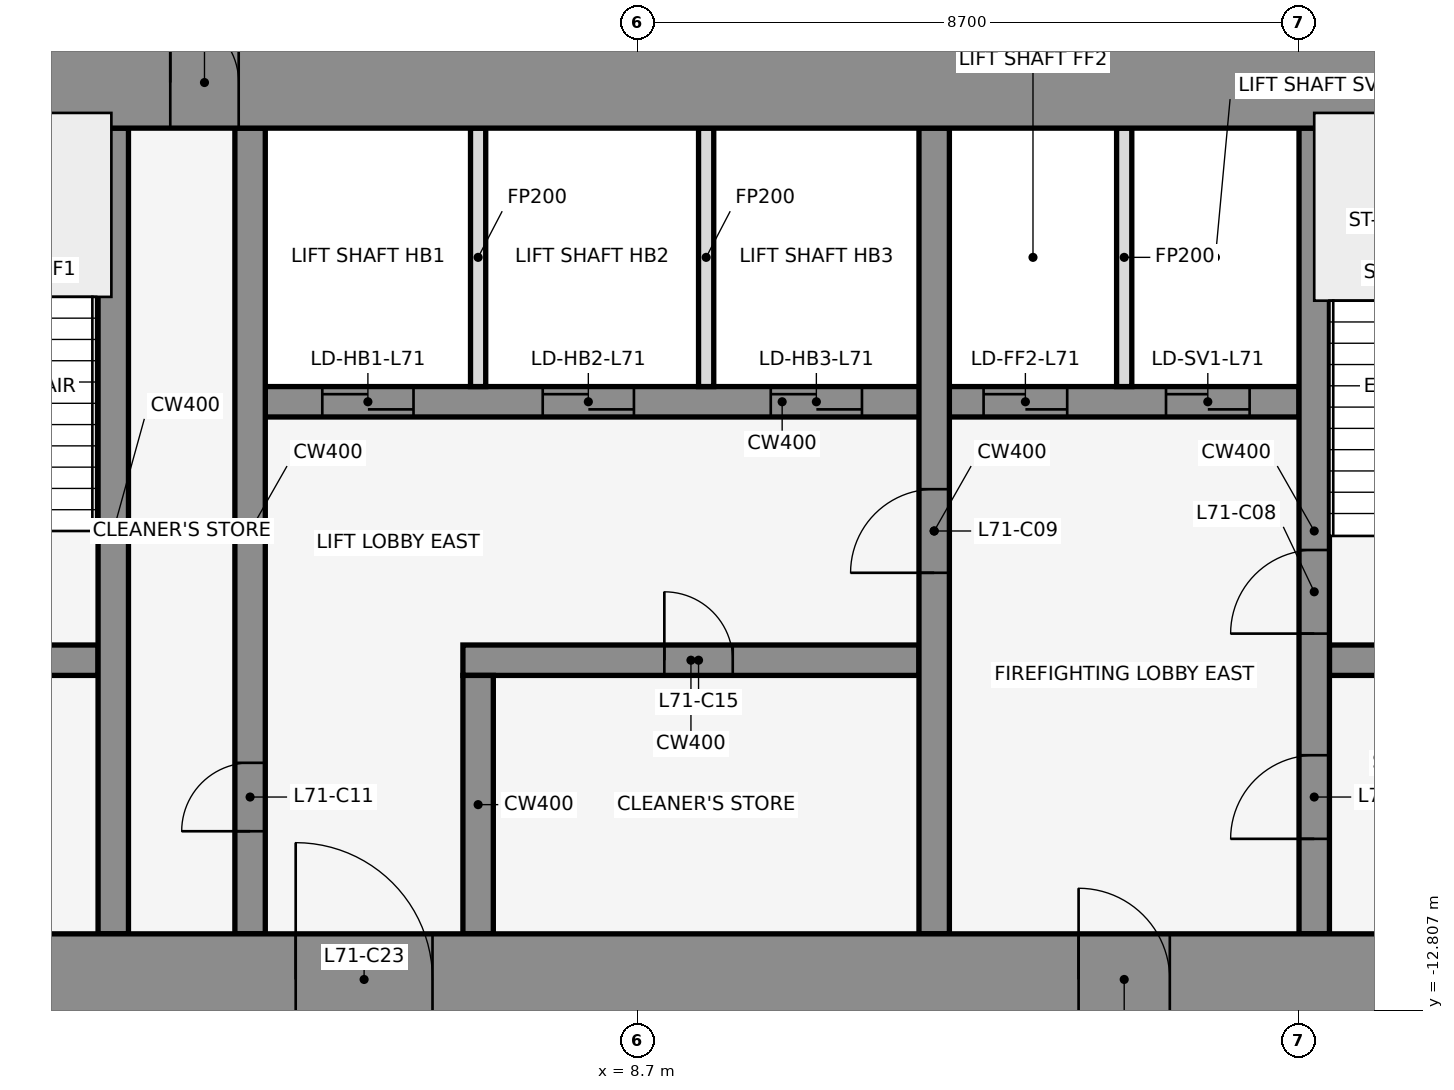
"""IFC4 building model, lengths in metres.
Left out: names, types, materials, properties, quantities, classifications, styles, units other than length and angle.
Written with IfcOpenShell. Run it as: python <this file> out.ifc"""

import sys

from ifc_helpers import new_model, si_unit, direction, frame, frame_2d, origin, place, context, subcontext, project, spatial, rectangle, extrude, element, fill, save


model = new_model("IFC4")
c1 = context("Model", 3, precision=1e-05, world=origin(), true_north=direction((0.0, 1.0)))
c2 = subcontext(c1, "Body", "Model", "MODEL_VIEW")
j1 = project(units=[si_unit("LENGTHUNIT", "METRE"), si_unit("PLANEANGLEUNIT", "RADIAN")], contexts=[c1])
p1 = place(None, origin())
s1 = spatial("IfcSite", under=j1, at=p1, CompositionType="ELEMENT")
p2 = place(p1, origin())
s2 = spatial("IfcBuilding", under=s1, at=p2, CompositionType="ELEMENT")
p3 = place(p2, frame((0.0, 0.0, 315.5)))
s3 = spatial("IfcBuildingStorey", under=s2, at=p3, CompositionType="ELEMENT", Elevation=315.5)
for number, where, z_axis, x_axis in (
    (1, (16.432, -0.105, 0.0), (0.0, 0.0, 1.0), (-0.84, 0.543, 0.0)),
    (2, (1.901, 1.08, 0.0), (0.0, 0.0, 1.0), (-0.84, -0.543, 0.0)),
):
    element("IfcWall", number, at=place(p3, frame(where, z_axis=z_axis, x_axis=x_axis)), inside=s3, PredefinedType="STANDARD", context=c2, shape_type="SweptSolid", body=[
        extrude(rectangle(XDim=2.183, YDim=0.25, at=frame_2d((1.091, 0.0))), origin(), (0.0, 0.0, 1.0), 4.35),
    ])
p4 = place(p3, frame((-1.6, -8.2, 0.0), z_axis=(0.0, 0.0, 1.0), x_axis=(1.0, 0.0, 0.0)))
e3 = element("IfcWall", 3, at=p4, inside=s3, PredefinedType="SHEAR", context=c2, shape_type="SweptSolid", body=[
    extrude(rectangle(XDim=3.2, YDim=0.4, at=frame_2d((1.6, 0.0))), origin(), (0.0, 0.0, 1.0), 4.5),
])
p5 = place(p4, frame((1.05, 0.0, 0.0)))
e4 = element("IfcOpeningElement", 4, at=p5, cuts=e3, PredefinedType="OPENING", context=c2, shape_type="SweptSolid", body=[
    extrude(rectangle(XDim=1.2, YDim=2.1, at=frame_2d((0.6, 1.05))), frame((0.0, 0.212, 0.0), z_axis=(0.0, -1.0, 0.0), x_axis=(1.0, 0.0, 0.0)), (0.0, 0.0, 1.0), 0.424),
])
p6 = place(p3, frame((6.4, -8.2, 0.0), z_axis=(0.0, 0.0, 1.0), x_axis=(1.0, 0.0, 0.0)))
e5 = element("IfcWall", 5, at=p6, inside=s3, PredefinedType="SHEAR", context=c2, shape_type="SweptSolid", body=[
    extrude(rectangle(XDim=6.0, YDim=0.4, at=frame_2d((3.0, 0.0))), origin(), (0.0, 0.0, 1.0), 4.5),
])
p7 = place(p6, frame((2.65, 0.0, 0.0)))
e6 = element("IfcOpeningElement", 6, at=p7, cuts=e5, PredefinedType="OPENING", context=c2, shape_type="SweptSolid", body=[
    extrude(rectangle(XDim=0.9, YDim=2.1, at=frame_2d((0.45, 1.05))), frame((0.0, 0.212, 0.0), z_axis=(0.0, -1.0, 0.0), x_axis=(1.0, 0.0, 0.0)), (0.0, 0.0, 1.0), 0.424),
])
p8 = place(p3, frame((17.8, -8.2, 0.0), z_axis=(0.0, 0.0, 1.0), x_axis=(1.0, 0.0, 0.0)))
e7 = element("IfcWall", 7, at=p8, inside=s3, PredefinedType="SHEAR", context=c2, shape_type="SweptSolid", body=[
    extrude(rectangle(XDim=3.0, YDim=0.4, at=frame_2d((1.5, 0.0))), origin(), (0.0, 0.0, 1.0), 4.5),
])
p9 = place(p8, frame((0.85, 0.0, 0.0)))
e8 = element("IfcOpeningElement", 8, at=p9, cuts=e7, PredefinedType="OPENING", context=c2, shape_type="SweptSolid", body=[
    extrude(rectangle(XDim=1.2, YDim=2.1, at=frame_2d((0.6, 1.05))), frame((0.0, 0.212, 0.0), z_axis=(0.0, -1.0, 0.0), x_axis=(1.0, 0.0, 0.0)), (0.0, 0.0, 1.0), 0.424),
])
p10 = place(p3, frame((3.8, -4.8, 0.0), z_axis=(0.0, 0.0, 1.0), x_axis=(1.0, 0.0, 0.0)))
e9 = element("IfcWall", 9, at=p10, inside=s3, PredefinedType="SHEAR", context=c2, shape_type="SweptSolid", body=[
    extrude(rectangle(XDim=13.6, YDim=0.4, at=frame_2d((6.8, 0.0))), origin(), (0.0, 0.0, 1.0), 4.5),
])
p11 = place(p10, frame((0.75, 0.0, 0.0)))
e10 = element("IfcOpeningElement", 10, at=p11, cuts=e9, PredefinedType="OPENING", context=c2, shape_type="SweptSolid", body=[
    extrude(rectangle(XDim=1.2, YDim=2.1, at=frame_2d((0.6, 1.05))), frame((0.0, 0.212, 0.0), z_axis=(0.0, -1.0, 0.0), x_axis=(1.0, 0.0, 0.0)), (0.0, 0.0, 1.0), 0.424),
])
p12 = place(p10, frame((3.65, 0.0, 0.0)))
e11 = element("IfcOpeningElement", 11, at=p12, cuts=e9, PredefinedType="OPENING", context=c2, shape_type="SweptSolid", body=[
    extrude(rectangle(XDim=1.2, YDim=2.1, at=frame_2d((0.6, 1.05))), frame((0.0, 0.212, 0.0), z_axis=(0.0, -1.0, 0.0), x_axis=(1.0, 0.0, 0.0)), (0.0, 0.0, 1.0), 0.424),
])
p13 = place(p10, frame((6.65, 0.0, 0.0)))
e12 = element("IfcOpeningElement", 12, at=p13, cuts=e9, PredefinedType="OPENING", context=c2, shape_type="SweptSolid", body=[
    extrude(rectangle(XDim=1.2, YDim=2.1, at=frame_2d((0.6, 1.05))), frame((0.0, 0.212, 0.0), z_axis=(0.0, -1.0, 0.0), x_axis=(1.0, 0.0, 0.0)), (0.0, 0.0, 1.0), 0.424),
])
p14 = place(p10, frame((9.45, 0.0, 0.0)))
e13 = element("IfcOpeningElement", 13, at=p14, cuts=e9, PredefinedType="OPENING", context=c2, shape_type="SweptSolid", body=[
    extrude(rectangle(XDim=1.1, YDim=2.1, at=frame_2d((0.55, 1.05))), frame((0.0, 0.212, 0.0), z_axis=(0.0, -1.0, 0.0), x_axis=(1.0, 0.0, 0.0)), (0.0, 0.0, 1.0), 0.424),
])
p15 = place(p10, frame((11.85, 0.0, 0.0)))
e14 = element("IfcOpeningElement", 14, at=p15, cuts=e9, PredefinedType="OPENING", context=c2, shape_type="SweptSolid", body=[
    extrude(rectangle(XDim=1.1, YDim=2.1, at=frame_2d((0.55, 1.05))), frame((0.0, 0.212, 0.0), z_axis=(0.0, -1.0, 0.0), x_axis=(1.0, 0.0, 0.0)), (0.0, 0.0, 1.0), 0.424),
])
p16 = place(p3, frame((1.8, -11.8, 0.0), z_axis=(0.0, 0.0, 1.0), x_axis=(0.0, 1.0, 0.0)))
e15 = element("IfcWall", 15, at=p16, inside=s3, PredefinedType="SHEAR", context=c2, shape_type="SweptSolid", body=[
    extrude(rectangle(XDim=10.6, YDim=0.4, at=frame_2d((5.3, 0.0))), origin(), (0.0, 0.0, 1.0), 4.5),
])
p17 = place(p3, frame((3.6, -11.8, 0.0), z_axis=(0.0, 0.0, 1.0), x_axis=(0.0, 1.0, 0.0)))
e16 = element("IfcWall", 16, at=p17, inside=s3, PredefinedType="SHEAR", context=c2, shape_type="SweptSolid", body=[
    extrude(rectangle(XDim=10.6, YDim=0.4, at=frame_2d((5.3, 0.0))), origin(), (0.0, 0.0, 1.0), 4.5),
])
p18 = place(p17, frame((1.35, 0.0, 0.0)))
e17 = element("IfcOpeningElement", 17, at=p18, cuts=e16, PredefinedType="OPENING", context=c2, shape_type="SweptSolid", body=[
    extrude(rectangle(XDim=0.9, YDim=2.1, at=frame_2d((0.45, 1.05))), frame((0.0, 0.212, 0.0), z_axis=(0.0, -1.0, 0.0), x_axis=(1.0, 0.0, 0.0)), (0.0, 0.0, 1.0), 0.424),
])
p19 = place(p3, frame((6.6, -11.8, 0.0), z_axis=(0.0, 0.0, 1.0), x_axis=(0.0, 1.0, 0.0)))
e18 = element("IfcWall", 18, at=p19, inside=s3, PredefinedType="SHEAR", context=c2, shape_type="SweptSolid", body=[
    extrude(rectangle(XDim=3.4, YDim=0.4, at=frame_2d((1.7, 0.0))), origin(), (0.0, 0.0, 1.0), 4.5),
])
for number, where, z_axis, x_axis in (
    (19, (6.6, -4.6, 0.0), (0.0, 0.0, 1.0), (0.0, 1.0, 0.0)),
    (20, (9.6, -4.6, 0.0), (0.0, 0.0, 1.0), (0.0, 1.0, 0.0)),
):
    element("IfcWall", number, at=place(p3, frame(where, z_axis=z_axis, x_axis=x_axis)), inside=s3, PredefinedType="PARTITIONING", context=c2, shape_type="SweptSolid", body=[
        extrude(rectangle(XDim=3.4, YDim=0.2, at=frame_2d((1.7, 0.0))), origin(), (0.0, 0.0, 1.0), 3.418),
    ])
p20 = place(p3, frame((12.6, -11.8, 0.0), z_axis=(0.0, 0.0, 1.0), x_axis=(0.0, 1.0, 0.0)))
e21 = element("IfcWall", 21, at=p20, inside=s3, PredefinedType="SHEAR", context=c2, shape_type="SweptSolid", body=[
    extrude(rectangle(XDim=10.6, YDim=0.4, at=frame_2d((5.3, 0.0))), origin(), (0.0, 0.0, 1.0), 4.5),
])
p21 = place(p20, frame((4.75, 0.0, 0.0)))
e22 = element("IfcOpeningElement", 22, at=p21, cuts=e21, PredefinedType="OPENING", context=c2, shape_type="SweptSolid", body=[
    extrude(rectangle(XDim=1.1, YDim=2.1, at=frame_2d((0.55, 1.05))), frame((0.0, 0.212, 0.0), z_axis=(0.0, -1.0, 0.0), x_axis=(1.0, 0.0, 0.0)), (0.0, 0.0, 1.0), 0.424),
])
p22 = place(p3, frame((15.1, -4.6, 0.0), z_axis=(0.0, 0.0, 1.0), x_axis=(0.0, 1.0, 0.0)))
e23 = element("IfcWall", 23, at=p22, inside=s3, PredefinedType="PARTITIONING", context=c2, shape_type="SweptSolid", body=[
    extrude(rectangle(XDim=3.4, YDim=0.2, at=frame_2d((1.7, 0.0))), origin(), (0.0, 0.0, 1.0), 3.418),
])
p23 = place(p3, frame((17.6, -11.8, 0.0), z_axis=(0.0, 0.0, 1.0), x_axis=(0.0, 1.0, 0.0)))
e24 = element("IfcWall", 24, at=p23, inside=s3, PredefinedType="SHEAR", context=c2, shape_type="SweptSolid", body=[
    extrude(rectangle(XDim=10.6, YDim=0.4, at=frame_2d((5.3, 0.0))), origin(), (0.0, 0.0, 1.0), 4.5),
])
p24 = place(p23, frame((1.25, 0.0, 0.0)))
e25 = element("IfcOpeningElement", 25, at=p24, cuts=e24, PredefinedType="OPENING", context=c2, shape_type="SweptSolid", body=[
    extrude(rectangle(XDim=1.1, YDim=2.1, at=frame_2d((0.55, 1.05))), frame((0.0, 0.212, 0.0), z_axis=(0.0, -1.0, 0.0), x_axis=(1.0, 0.0, 0.0)), (0.0, 0.0, 1.0), 0.424),
])
p25 = place(p23, frame((3.95, 0.0, 0.0)))
e26 = element("IfcOpeningElement", 26, at=p25, cuts=e24, PredefinedType="OPENING", context=c2, shape_type="SweptSolid", body=[
    extrude(rectangle(XDim=1.1, YDim=2.1, at=frame_2d((0.55, 1.05))), frame((0.0, 0.212, 0.0), z_axis=(0.0, -1.0, 0.0), x_axis=(1.0, 0.0, 0.0)), (0.0, 0.0, 1.0), 0.424),
])
p26 = place(p3, frame((-22.0, -0.6, 0.0), z_axis=(0.0, 0.0, 1.0), x_axis=(1.0, 0.0, 0.0)))
e27 = element("IfcWall", 27, at=p26, inside=s3, PredefinedType="SHEAR", context=c2, shape_type="SweptSolid", body=[
    extrude(rectangle(XDim=44.0, YDim=1.2, at=frame_2d((22.0, 0.0))), origin(), (0.0, 0.0, 1.0), 4.5),
])
p27 = place(p26, frame((18.55, 0.0, 0.0)))
e28 = element("IfcOpeningElement", 28, at=p27, cuts=e27, PredefinedType="OPENING", context=c2, shape_type="SweptSolid", body=[
    extrude(rectangle(XDim=0.9, YDim=2.1, at=frame_2d((0.45, 1.05))), frame((0.0, 0.612, 0.0), z_axis=(0.0, -1.0, 0.0), x_axis=(1.0, 0.0, 0.0)), (0.0, 0.0, 1.0), 1.224),
])
p28 = place(p26, frame((24.55, 0.0, 0.0)))
e29 = element("IfcOpeningElement", 29, at=p28, cuts=e27, PredefinedType="OPENING", context=c2, shape_type="SweptSolid", body=[
    extrude(rectangle(XDim=0.9, YDim=2.1, at=frame_2d((0.45, 1.05))), frame((0.0, 0.612, 0.0), z_axis=(0.0, -1.0, 0.0), x_axis=(1.0, 0.0, 0.0)), (0.0, 0.0, 1.0), 1.224),
])
p29 = place(p3, frame((-22.0, -12.4, 0.0), z_axis=(0.0, 0.0, 1.0), x_axis=(1.0, 0.0, 0.0)))
e30 = element("IfcWall", 30, at=p29, inside=s3, PredefinedType="SHEAR", context=c2, shape_type="SweptSolid", body=[
    extrude(rectangle(XDim=44.0, YDim=1.2, at=frame_2d((22.0, 0.0))), origin(), (0.0, 0.0, 1.0), 4.5),
])
p30 = place(p29, frame((2.2, 0.0, 0.0)))
e31 = element("IfcOpeningElement", 31, at=p30, cuts=e30, PredefinedType="OPENING", context=c2, shape_type="SweptSolid", body=[
    extrude(rectangle(XDim=1.2, YDim=2.1, at=frame_2d((0.6, 1.05))), frame((0.0, 0.612, 0.0), z_axis=(0.0, -1.0, 0.0), x_axis=(1.0, 0.0, 0.0)), (0.0, 0.0, 1.0), 1.224),
])
p31 = place(p29, frame((21.4, 0.0, 0.0)))
e32 = element("IfcOpeningElement", 32, at=p31, cuts=e30, PredefinedType="OPENING", context=c2, shape_type="SweptSolid", body=[
    extrude(rectangle(XDim=1.2, YDim=2.1, at=frame_2d((0.6, 1.05))), frame((0.0, 0.612, 0.0), z_axis=(0.0, -1.0, 0.0), x_axis=(1.0, 0.0, 0.0)), (0.0, 0.0, 1.0), 1.224),
])
p32 = place(p29, frame((40.6, 0.0, 0.0)))
e33 = element("IfcOpeningElement", 33, at=p32, cuts=e30, PredefinedType="OPENING", context=c2, shape_type="SweptSolid", body=[
    extrude(rectangle(XDim=1.2, YDim=2.1, at=frame_2d((0.6, 1.05))), frame((0.0, 0.612, 0.0), z_axis=(0.0, -1.0, 0.0), x_axis=(1.0, 0.0, 0.0)), (0.0, 0.0, 1.0), 1.224),
])
p33 = place(p29, frame((16.0, 0.0, 0.0)))
e34 = element("IfcOpeningElement", 34, at=p33, cuts=e30, PredefinedType="OPENING", context=c2, shape_type="SweptSolid", body=[
    extrude(rectangle(XDim=1.8, YDim=2.1, at=frame_2d((0.9, 1.05))), frame((0.0, 0.612, 0.0), z_axis=(0.0, -1.0, 0.0), x_axis=(1.0, 0.0, 0.0)), (0.0, 0.0, 1.0), 1.224),
])
p34 = place(p29, frame((6.3, 0.0, 0.0)))
e35 = element("IfcOpeningElement", 35, at=p34, cuts=e30, PredefinedType="OPENING", context=c2, shape_type="SweptSolid", body=[
    extrude(rectangle(XDim=1.2, YDim=2.1, at=frame_2d((0.6, 1.05))), frame((0.0, 0.612, 0.0), z_axis=(0.0, -1.0, 0.0), x_axis=(1.0, 0.0, 0.0)), (0.0, 0.0, 1.0), 1.224),
])
p35 = place(p29, frame((26.2, 0.0, 0.0)))
e36 = element("IfcOpeningElement", 36, at=p35, cuts=e30, PredefinedType="OPENING", context=c2, shape_type="SweptSolid", body=[
    extrude(rectangle(XDim=1.8, YDim=2.1, at=frame_2d((0.9, 1.05))), frame((0.0, 0.612, 0.0), z_axis=(0.0, -1.0, 0.0), x_axis=(1.0, 0.0, 0.0)), (0.0, 0.0, 1.0), 1.224),
])
p36 = place(p29, frame((36.5, 0.0, 0.0)))
e37 = element("IfcOpeningElement", 37, at=p36, cuts=e30, PredefinedType="OPENING", context=c2, shape_type="SweptSolid", body=[
    extrude(rectangle(XDim=1.2, YDim=2.1, at=frame_2d((0.6, 1.05))), frame((0.0, 0.612, 0.0), z_axis=(0.0, -1.0, 0.0), x_axis=(1.0, 0.0, 0.0)), (0.0, 0.0, 1.0), 1.224),
])
p37 = place(p24, origin())
e38 = element("IfcDoor", 38, at=p37, inside=s3, OperationType="SINGLE_SWING_LEFT", PredefinedType="DOOR", context=c2, shape_type="SweptSolid", body=[
    extrude(rectangle(XDim=1.1, YDim=2.1, at=frame_2d((0.55, 1.05))), frame((0.0, 0.025, 0.0), z_axis=(0.0, -1.0, 0.0), x_axis=(1.0, 0.0, 0.0)), (0.0, 0.0, 1.0), 0.05),
])
fill(e25, e38)
p38 = place(p11, origin())
e39 = element("IfcDoor", 39, at=p38, inside=s3, OperationType="DOUBLE_DOOR_SLIDING", PredefinedType="DOOR", context=c2, shape_type="SweptSolid", body=[
    extrude(rectangle(XDim=1.2, YDim=2.1, at=frame_2d((0.6, 1.05))), frame((0.0, 0.025, 0.0), z_axis=(0.0, -1.0, 0.0), x_axis=(1.0, 0.0, 0.0)), (0.0, 0.0, 1.0), 0.05),
])
fill(e10, e39)
p39 = place(p12, origin())
e40 = element("IfcDoor", 40, at=p39, inside=s3, OperationType="DOUBLE_DOOR_SLIDING", PredefinedType="DOOR", context=c2, shape_type="SweptSolid", body=[
    extrude(rectangle(XDim=1.2, YDim=2.1, at=frame_2d((0.6, 1.05))), frame((0.0, 0.025, 0.0), z_axis=(0.0, -1.0, 0.0), x_axis=(1.0, 0.0, 0.0)), (0.0, 0.0, 1.0), 0.05),
])
fill(e11, e40)
p40 = place(p13, origin())
e41 = element("IfcDoor", 41, at=p40, inside=s3, OperationType="DOUBLE_DOOR_SLIDING", PredefinedType="DOOR", context=c2, shape_type="SweptSolid", body=[
    extrude(rectangle(XDim=1.2, YDim=2.1, at=frame_2d((0.6, 1.05))), frame((0.0, 0.025, 0.0), z_axis=(0.0, -1.0, 0.0), x_axis=(1.0, 0.0, 0.0)), (0.0, 0.0, 1.0), 0.05),
])
fill(e12, e41)
p41 = place(p14, origin())
e42 = element("IfcDoor", 42, at=p41, inside=s3, OperationType="DOUBLE_DOOR_SLIDING", PredefinedType="DOOR", context=c2, shape_type="SweptSolid", body=[
    extrude(rectangle(XDim=1.1, YDim=2.1, at=frame_2d((0.55, 1.05))), frame((0.0, 0.025, 0.0), z_axis=(0.0, -1.0, 0.0), x_axis=(1.0, 0.0, 0.0)), (0.0, 0.0, 1.0), 0.05),
])
fill(e13, e42)
p42 = place(p15, origin())
e43 = element("IfcDoor", 43, at=p42, inside=s3, OperationType="DOUBLE_DOOR_SLIDING", PredefinedType="DOOR", context=c2, shape_type="SweptSolid", body=[
    extrude(rectangle(XDim=1.1, YDim=2.1, at=frame_2d((0.55, 1.05))), frame((0.0, 0.025, 0.0), z_axis=(0.0, -1.0, 0.0), x_axis=(1.0, 0.0, 0.0)), (0.0, 0.0, 1.0), 0.05),
])
fill(e14, e43)
p43 = place(p25, origin())
e44 = element("IfcDoor", 44, at=p43, inside=s3, OperationType="SINGLE_SWING_RIGHT", PredefinedType="DOOR", context=c2, shape_type="SweptSolid", body=[
    extrude(rectangle(XDim=1.1, YDim=2.1, at=frame_2d((0.55, 1.05))), frame((0.0, 0.025, 0.0), z_axis=(0.0, -1.0, 0.0), x_axis=(1.0, 0.0, 0.0)), (0.0, 0.0, 1.0), 0.05),
])
fill(e26, e44)
p44 = place(p21, frame((1.1, 0.0, 0.0), z_axis=(0.0, 0.0, 1.0), x_axis=(-1.0, 0.0, 0.0)))
e45 = element("IfcDoor", 45, at=p44, inside=s3, OperationType="SINGLE_SWING_RIGHT", PredefinedType="DOOR", context=c2, shape_type="SweptSolid", body=[
    extrude(rectangle(XDim=1.1, YDim=2.1, at=frame_2d((0.55, 1.05))), frame((0.0, 0.025, 0.0), z_axis=(0.0, -1.0, 0.0), x_axis=(1.0, 0.0, 0.0)), (0.0, 0.0, 1.0), 0.05),
])
fill(e22, e45)
p45 = place(p18, origin())
e46 = element("IfcDoor", 46, at=p45, inside=s3, OperationType="SINGLE_SWING_LEFT", PredefinedType="DOOR", context=c2, shape_type="SweptSolid", body=[
    extrude(rectangle(XDim=0.9, YDim=2.1, at=frame_2d((0.45, 1.05))), frame((0.0, 0.025, 0.0), z_axis=(0.0, -1.0, 0.0), x_axis=(1.0, 0.0, 0.0)), (0.0, 0.0, 1.0), 0.05),
])
fill(e17, e46)
p46 = place(p7, frame((0.9, 0.0, 0.0), z_axis=(0.0, 0.0, 1.0), x_axis=(-1.0, 0.0, 0.0)))
e47 = element("IfcDoor", 47, at=p46, inside=s3, OperationType="SINGLE_SWING_RIGHT", PredefinedType="DOOR", context=c2, shape_type="SweptSolid", body=[
    extrude(rectangle(XDim=0.9, YDim=2.1, at=frame_2d((0.45, 1.05))), frame((0.0, 0.025, 0.0), z_axis=(0.0, -1.0, 0.0), x_axis=(1.0, 0.0, 0.0)), (0.0, 0.0, 1.0), 0.05),
])
fill(e6, e47)
p47 = place(p28, origin())
e48 = element("IfcDoor", 48, at=p47, inside=s3, OperationType="SINGLE_SWING_LEFT", PredefinedType="DOOR", context=c2, shape_type="SweptSolid", body=[
    extrude(rectangle(XDim=0.9, YDim=2.1, at=frame_2d((0.45, 1.05))), frame((0.0, 0.025, 0.0), z_axis=(0.0, -1.0, 0.0), x_axis=(1.0, 0.0, 0.0)), (0.0, 0.0, 1.0), 0.05),
])
fill(e29, e48)
p48 = place(p35, origin())
e49 = element("IfcDoor", 49, at=p48, inside=s3, OperationType="SINGLE_SWING_LEFT", PredefinedType="DOOR", context=c2, shape_type="SweptSolid", body=[
    extrude(rectangle(XDim=1.8, YDim=2.1, at=frame_2d((0.9, 1.05))), frame((0.0, 0.025, 0.0), z_axis=(0.0, -1.0, 0.0), x_axis=(1.0, 0.0, 0.0)), (0.0, 0.0, 1.0), 0.05),
])
fill(e36, e49)
p49 = place(p36, frame((1.2, 0.0, 0.0), z_axis=(0.0, 0.0, 1.0), x_axis=(-1.0, 0.0, 0.0)))
e50 = element("IfcDoor", 50, at=p49, inside=s3, OperationType="SINGLE_SWING_RIGHT", PredefinedType="DOOR", context=c2, shape_type="SweptSolid", body=[
    extrude(rectangle(XDim=1.2, YDim=2.1, at=frame_2d((0.6, 1.05))), frame((0.0, 0.025, 0.0), z_axis=(0.0, -1.0, 0.0), x_axis=(1.0, 0.0, 0.0)), (0.0, 0.0, 1.0), 0.05),
])
fill(e37, e50)
save(model, sys.argv[1])
